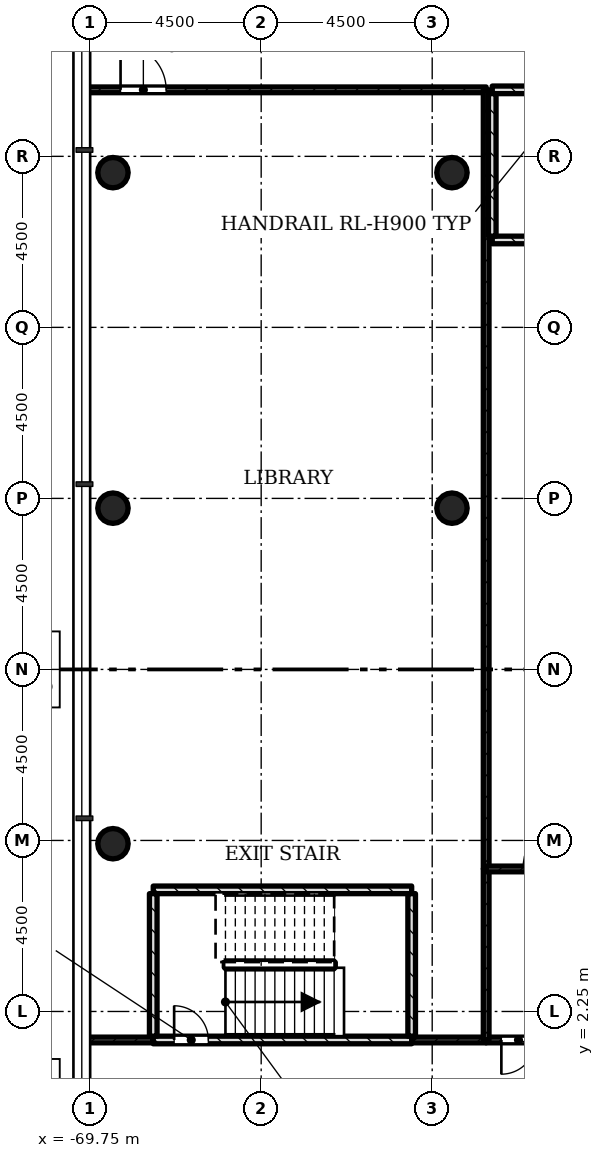
"""IFC4 building model, lengths in metres.
Left out: names, types, materials, properties, quantities, classifications, styles, units other than length and angle.
Written with IfcOpenShell. Run it as: python <this file> out.ifc"""

import sys

from ifc_helpers import new_model, si_unit, direction, frame, frame_2d, origin, origin_2d, place, context, subcontext, project, spatial, rectangle, hollow_circle, extrude, element, fill, save


model = new_model("IFC4")
c1 = context("Model", 3, precision=1e-05, world=origin(), true_north=direction((0.0, 1.0)))
c2 = subcontext(c1, "Body", "Model", "MODEL_VIEW")
j1 = project(units=[si_unit("LENGTHUNIT", "METRE"), si_unit("PLANEANGLEUNIT", "RADIAN")], contexts=[c1])
p1 = place(None, origin())
s1 = spatial("IfcSite", under=j1, at=p1, CompositionType="ELEMENT")
p2 = place(p1, origin())
s2 = spatial("IfcBuilding", under=s1, at=p2, CompositionType="ELEMENT")
p3 = place(p2, frame((0.0, 0.0, 11.0)))
s3 = spatial("IfcBuildingStorey", under=s2, at=p3, CompositionType="ELEMENT", Elevation=11.0)
for number, where, z_axis, x_axis in (
    (1, (-69.15, 6.664, 0.0), (0.0, 0.0, 1.0), (1.0, 0.0, 0.0)),
    (2, (-69.15, 15.493, 0.0), (0.0, 0.0, 1.0), (1.0, 0.0, 0.0)),
    (3, (-60.23, 15.493, 0.0), (0.0, 0.0, 1.0), (1.0, 0.0, 0.0)),
    (4, (-69.15, 24.321, 0.0), (0.0, 0.0, 1.0), (1.0, 0.0, 0.0)),
    (5, (-60.23, 24.321, 0.0), (0.0, 0.0, 1.0), (1.0, 0.0, 0.0)),
):
    element("IfcColumn", number, at=place(p3, frame(where, z_axis=z_axis, x_axis=x_axis)), inside=s3, PredefinedType="COLUMN", context=c2, shape_type="SweptSolid", body=[
        extrude(hollow_circle(Radius=0.4, WallThickness=0.028, at=origin_2d()), origin(), (0.0, 0.0, 1.0), 4.5),
    ])
p4 = place(p3, frame((-59.33, 1.5, 0.0), z_axis=(0.0, 0.0, 1.0), x_axis=(-1.0, 0.0, 0.0)))
e6 = element("IfcWall", 6, at=p4, inside=s3, PredefinedType="PARTITIONING", context=c2, shape_type="SweptSolid", body=[
    extrude(rectangle(XDim=1.96, YDim=0.15, at=frame_2d((0.98, 0.0))), origin(), (0.0, 0.0, 1.0), 4.08),
])
p5 = place(p3, frame((-68.09, 1.5, 0.0), z_axis=(0.0, 0.0, 1.0), x_axis=(-1.0, 0.0, 0.0)))
e7 = element("IfcWall", 7, at=p5, inside=s3, PredefinedType="PARTITIONING", context=c2, shape_type="SweptSolid", body=[
    extrude(rectangle(XDim=1.76, YDim=0.15, at=frame_2d((0.88, 0.0))), origin(), (0.0, 0.0, 1.0), 4.08),
])
p6 = place(p3, frame((-69.85, 26.5, 0.0), z_axis=(0.0, 0.0, 1.0), x_axis=(1.0, 0.0, 0.0)))
e8 = element("IfcWall", 8, at=p6, inside=s3, PredefinedType="PARTITIONING", context=c2, shape_type="SweptSolid", body=[
    extrude(rectangle(XDim=10.52, YDim=0.15, at=frame_2d((5.26, 0.0))), origin(), (0.0, 0.0, 1.0), 4.08),
])
p7 = place(p6, frame((0.9, 0.0, 0.0)))
e9 = element("IfcOpeningElement", 9, at=p7, cuts=e8, PredefinedType="OPENING", context=c2, shape_type="SweptSolid", body=[
    extrude(rectangle(XDim=1.2, YDim=2.1, at=frame_2d((0.6, 1.05))), frame((0.0, 0.085, 0.0), z_axis=(0.0, -1.0, 0.0), x_axis=(1.0, 0.0, 0.0)), (0.0, 0.0, 1.0), 0.17),
])
p8 = place(p3, frame((-59.33, 26.5, 0.0), z_axis=(0.0, 0.0, 1.0), x_axis=(0.0, -1.0, 0.0)))
e10 = element("IfcWall", 10, at=p8, inside=s3, PredefinedType="PARTITIONING", context=c2, shape_type="SweptSolid", body=[
    extrude(rectangle(XDim=20.5, YDim=0.15, at=frame_2d((10.25, 0.0))), origin(), (0.0, 0.0, 1.0), 4.08),
])
p9 = place(p3, frame((-59.33, 1.5, 0.0), z_axis=(0.0, 0.0, 1.0), x_axis=(1.0, 0.0, 0.0)))
e11 = element("IfcWall", 11, at=p9, inside=s3, PredefinedType="PARTITIONING", context=c2, shape_type="SweptSolid", body=[
    extrude(rectangle(XDim=4.0, YDim=0.15, at=frame_2d((2.0, 0.0))), origin(), (0.0, 0.0, 1.0), 4.08),
])
p10 = place(p9, frame((0.4, 0.0, 0.0)))
e12 = element("IfcOpeningElement", 12, at=p10, cuts=e11, PredefinedType="OPENING", context=c2, shape_type="SweptSolid", body=[
    extrude(rectangle(XDim=0.9, YDim=2.1, at=frame_2d((0.45, 1.05))), frame((0.0, 0.085, 0.0), z_axis=(0.0, -1.0, 0.0), x_axis=(1.0, 0.0, 0.0)), (0.0, 0.0, 1.0), 0.17),
])
p11 = place(p3, frame((-59.33, 6.0, 0.0), z_axis=(0.0, 0.0, 1.0), x_axis=(0.0, -1.0, 0.0)))
e13 = element("IfcWall", 13, at=p11, inside=s3, PredefinedType="PARTITIONING", context=c2, shape_type="SweptSolid", body=[
    extrude(rectangle(XDim=4.5, YDim=0.15, at=frame_2d((2.25, 0.0))), origin(), (0.0, 0.0, 1.0), 4.08),
])
p12 = place(p3, frame((-55.33, 6.0, 0.0), z_axis=(0.0, 0.0, 1.0), x_axis=(-1.0, 0.0, 0.0)))
e14 = element("IfcWall", 14, at=p12, inside=s3, PredefinedType="PARTITIONING", context=c2, shape_type="SweptSolid", body=[
    extrude(rectangle(XDim=4.0, YDim=0.15, at=frame_2d((2.0, 0.0))), origin(), (0.0, 0.0, 1.0), 4.08),
])
p13 = place(p3, frame((-59.17, 26.5, 0.0), z_axis=(0.0, 0.0, 1.0), x_axis=(1.0, 0.0, 0.0)))
e15 = element("IfcWall", 15, at=p13, inside=s3, PredefinedType="SHEAR", context=c2, shape_type="SweptSolid", body=[
    extrude(rectangle(XDim=6.8, YDim=0.2, at=frame_2d((3.4, 0.0))), origin(), (0.0, 0.0, 1.0), 4.08),
])
p14 = place(p13, frame((5.35, 0.0, 0.0)))
e16 = element("IfcOpeningElement", 16, at=p14, cuts=e15, PredefinedType="OPENING", context=c2, shape_type="SweptSolid", body=[
    extrude(rectangle(XDim=0.9, YDim=2.1, at=frame_2d((0.45, 1.05))), frame((0.0, 0.11, 0.0), z_axis=(0.0, -1.0, 0.0), x_axis=(1.0, 0.0, 0.0)), (0.0, 0.0, 1.0), 0.22),
])
p15 = place(p3, frame((-59.17, 22.55, 0.0), z_axis=(0.0, 0.0, 1.0), x_axis=(1.0, 0.0, 0.0)))
e17 = element("IfcWall", 17, at=p15, inside=s3, PredefinedType="SHEAR", context=c2, shape_type="SweptSolid", body=[
    extrude(rectangle(XDim=6.8, YDim=0.2, at=frame_2d((3.4, 0.0))), origin(), (0.0, 0.0, 1.0), 4.08),
])
p16 = place(p3, frame((-59.17, 22.65, 0.0), z_axis=(0.0, 0.0, 1.0), x_axis=(0.0, 1.0, 0.0)))
e18 = element("IfcWall", 18, at=p16, inside=s3, PredefinedType="SHEAR", context=c2, shape_type="SweptSolid", body=[
    extrude(rectangle(XDim=3.75, YDim=0.2, at=frame_2d((1.875, 0.0))), origin(), (0.0, 0.0, 1.0), 4.08),
])
p17 = place(p3, frame((-68.09, 1.5, 0.0), z_axis=(0.0, 0.0, 1.0), x_axis=(1.0, 0.0, 0.0)))
e19 = element("IfcWall", 19, at=p17, inside=s3, PredefinedType="SHEAR", context=c2, shape_type="SweptSolid", body=[
    extrude(rectangle(XDim=6.8, YDim=0.2, at=frame_2d((3.4, 0.0))), origin(), (0.0, 0.0, 1.0), 4.08),
])
p18 = place(p17, frame((0.55, 0.0, 0.0)))
e20 = element("IfcOpeningElement", 20, at=p18, cuts=e19, PredefinedType="OPENING", context=c2, shape_type="SweptSolid", body=[
    extrude(rectangle(XDim=0.9, YDim=2.1, at=frame_2d((0.45, 1.05))), frame((0.0, 0.11, 0.0), z_axis=(0.0, -1.0, 0.0), x_axis=(1.0, 0.0, 0.0)), (0.0, 0.0, 1.0), 0.22),
])
p19 = place(p3, frame((-68.09, 5.45, 0.0), z_axis=(0.0, 0.0, 1.0), x_axis=(1.0, 0.0, 0.0)))
e21 = element("IfcWall", 21, at=p19, inside=s3, PredefinedType="SHEAR", context=c2, shape_type="SweptSolid", body=[
    extrude(rectangle(XDim=6.8, YDim=0.2, at=frame_2d((3.4, 0.0))), origin(), (0.0, 0.0, 1.0), 4.08),
])
for number, where, z_axis, x_axis in (
    (22, (-68.09, 1.6, 0.0), (0.0, 0.0, 1.0), (0.0, 1.0, 0.0)),
    (23, (-61.29, 1.6, 0.0), (0.0, 0.0, 1.0), (0.0, 1.0, 0.0)),
):
    element("IfcWall", number, at=place(p3, frame(where, z_axis=z_axis, x_axis=x_axis)), inside=s3, PredefinedType="SHEAR", context=c2, shape_type="SweptSolid", body=[
        extrude(rectangle(XDim=3.75, YDim=0.2, at=frame_2d((1.875, 0.0))), origin(), (0.0, 0.0, 1.0), 4.08),
    ])
p20 = place(p7, origin())
e24 = element("IfcDoor", 24, at=p20, inside=s3, OperationType="SINGLE_SWING_RIGHT", PredefinedType="DOOR", context=c2, shape_type="SweptSolid", body=[
    extrude(rectangle(XDim=1.2, YDim=2.1, at=frame_2d((0.6, 1.05))), frame((0.0, 0.025, 0.0), z_axis=(0.0, -1.0, 0.0), x_axis=(1.0, 0.0, 0.0)), (0.0, 0.0, 1.0), 0.05),
])
fill(e9, e24)
p21 = place(p10, origin())
e25 = element("IfcDoor", 25, at=p21, inside=s3, OperationType="SINGLE_SWING_LEFT", PredefinedType="DOOR", context=c2, shape_type="SweptSolid", body=[
    extrude(rectangle(XDim=0.9, YDim=2.1, at=frame_2d((0.45, 1.05))), frame((0.0, 0.025, 0.0), z_axis=(0.0, -1.0, 0.0), x_axis=(1.0, 0.0, 0.0)), (0.0, 0.0, 1.0), 0.05),
])
fill(e12, e25)
p22 = place(p18, origin())
e26 = element("IfcDoor", 26, at=p22, inside=s3, OperationType="SINGLE_SWING_RIGHT", PredefinedType="DOOR", context=c2, shape_type="SweptSolid", body=[
    extrude(rectangle(XDim=0.9, YDim=2.1, at=frame_2d((0.45, 1.05))), frame((0.0, 0.025, 0.0), z_axis=(0.0, -1.0, 0.0), x_axis=(1.0, 0.0, 0.0)), (0.0, 0.0, 1.0), 0.05),
])
fill(e20, e26)
save(model, sys.argv[1])
